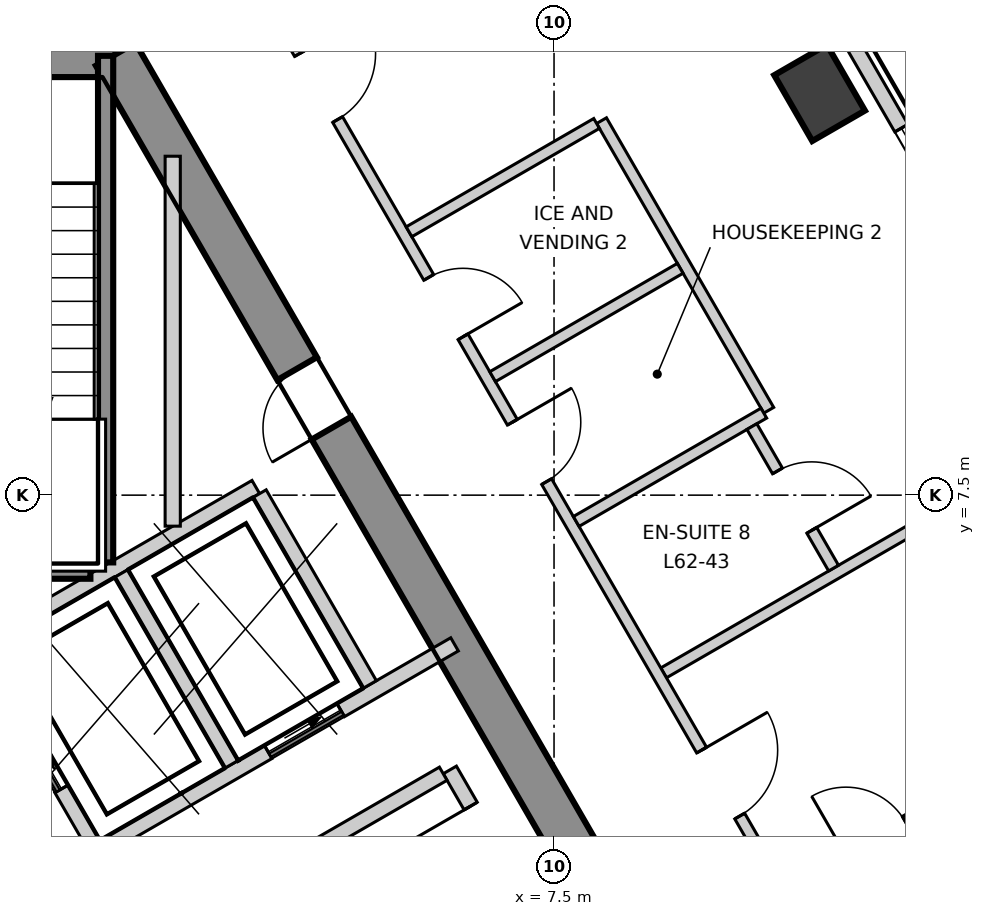
"""IFC4 building model, lengths in metres.
Left out: names, types, materials, properties, quantities, classifications, styles, units other than length and angle.
Written with IfcOpenShell. Run it as: python <this file> out.ifc"""

import sys

from ifc_helpers import new_model, si_unit, direction, frame, frame_2d, origin, origin_2d, place, context, subcontext, project, spatial, polyline, rectangle, outline, extrude, element, fill, save


model = new_model("IFC4")
c1 = context("Model", 3, precision=1e-05, world=origin(), true_north=direction((0.0, 1.0)))
c2 = subcontext(c1, "Body", "Model", "MODEL_VIEW")
j1 = project(units=[si_unit("LENGTHUNIT", "METRE"), si_unit("PLANEANGLEUNIT", "RADIAN")], contexts=[c1])
p1 = place(None, origin())
s1 = spatial("IfcSite", under=j1, at=p1, CompositionType="ELEMENT")
p2 = place(p1, origin())
s2 = spatial("IfcBuilding", under=s1, at=p2, CompositionType="ELEMENT")
p3 = place(p2, frame((0.0, 0.0, 268.3)))
s3 = spatial("IfcBuildingStorey", under=s2, at=p3, CompositionType="ELEMENT", Elevation=268.3)
p4 = place(p3, frame((1.732, 13.3, -0.3), z_axis=(0.0, 0.0, 1.0), x_axis=(-1.0, 0.0, 0.0)))
e1 = element("IfcWall", 1, at=p4, inside=s3, PredefinedType="SHEAR", context=c2, shape_type="SweptSolid", body=[
    extrude(outline(polyline([(-0.173, -0.3), (1.732, -0.3), (3.637, -0.3), (3.291, 0.3), (1.732, 0.3), (0.173, 0.3), (-0.173, -0.3)])), origin(), (0.0, 0.0, 1.0), 3.6),
])
p5 = place(p4, frame((1.032, 0.0, 0.3)))
e2 = element("IfcOpeningElement", 2, at=p5, cuts=e1, PredefinedType="OPENING", context=c2, shape_type="SweptSolid", body=[
    extrude(rectangle(XDim=1.4, YDim=2.1, at=frame_2d((0.7, 1.05))), frame((0.0, 0.31, 0.0), z_axis=(0.0, -1.0, 0.0), x_axis=(1.0, 0.0, 0.0)), (0.0, 0.0, 1.0), 0.62),
])
p6 = place(p3, frame((12.384, -5.15, -0.3), z_axis=(0.0, 0.0, 1.0), x_axis=(-0.500000539815, 0.866025092122, 0.0)))
e3 = element("IfcWall", 3, at=p6, inside=s3, PredefinedType="SHEAR", context=c2, shape_type="SweptSolid", body=[
    extrude(outline(polyline([(-0.173, -0.301), (1.795, -0.301), (3.763, -0.301), (5.731, -0.301), (7.7, -0.301), (9.668, -0.301), (11.636, -0.301), (13.604, -0.3), (15.573, -0.3), (17.541, -0.3), (19.509, -0.3), (21.477, -0.3), (21.131, 0.3), (19.226, 0.3), (17.321, 0.3), (15.415, 0.3), (13.51, 0.3), (11.605, 0.3), (9.699, 0.3), (7.794, 0.3), (5.889, 0.3), (3.984, 0.3), (2.078, 0.3), (0.173, 0.3), (-0.173, -0.301)])), origin(), (0.0, 0.0, 1.0), 3.6),
])
p7 = place(p6, frame((15.627, 0.0, 0.3)))
e4 = element("IfcOpeningElement", 4, at=p7, cuts=e3, PredefinedType="OPENING", context=c2, shape_type="SweptSolid", body=[
    extrude(rectangle(XDim=0.9, YDim=2.1, at=frame_2d((0.45, 1.05))), frame((0.0, 0.31, 0.0), z_axis=(0.0, -1.0, 0.0), x_axis=(1.0, 0.0, 0.0)), (0.0, 0.0, 1.0), 0.621),
])
p8 = place(p6, frame((4.026, 0.0, 0.3)))
e5 = element("IfcOpeningElement", 5, at=p8, cuts=e3, PredefinedType="OPENING", context=c2, shape_type="SweptSolid", body=[
    extrude(rectangle(XDim=0.9, YDim=2.1, at=frame_2d((0.45, 1.05))), frame((0.0, 0.31, 0.0), z_axis=(0.0, -1.0, 0.0), x_axis=(1.0, 0.0, 0.0)), (0.0, 0.0, 1.0), 0.621),
])
p9 = place(p3, frame((10.994, 12.792, -0.3), z_axis=(0.0, 0.0, 1.0), x_axis=(-0.5, 0.866025403784, 0.0)))
e6 = element("IfcColumn", 6, at=p9, inside=s3, PredefinedType="COLUMN", context=c2, shape_type="SweptSolid", body=[
    extrude(rectangle(XDim=1.0, YDim=0.8, at=origin_2d()), origin(), (0.0, 0.0, 1.0), 3.6),
])
p10 = place(p3, frame((26.205, -12.154, 0.0), z_axis=(0.0, 0.0, 1.0), x_axis=(-0.49999909388, 0.866025926932, 0.0)))
e7 = element("IfcWall", 7, at=p10, inside=s3, PredefinedType="ELEMENTEDWALL", context=c2, shape_type="SweptSolid", body=[
    extrude(rectangle(XDim=47.236, YDim=0.2, at=frame_2d((23.618, 0.0))), origin(), (0.0, 0.0, 1.0), 3.3),
])
p11 = place(p10, frame((2.243, 0.0, 0.9)))
e8 = element("IfcOpeningElement", 8, at=p11, cuts=e7, PredefinedType="OPENING", context=c2, shape_type="SweptSolid", body=[
    extrude(rectangle(XDim=3.7, YDim=2.2, at=frame_2d((1.85, 1.1))), frame((0.0, 0.11, 0.0), z_axis=(0.0, -1.0, 0.0), x_axis=(1.0, 0.0, 0.0)), (0.0, 0.0, 1.0), 0.22),
])
p12 = place(p10, frame((7.825, 0.0, 0.9)))
e9 = element("IfcOpeningElement", 9, at=p12, cuts=e7, PredefinedType="OPENING", context=c2, shape_type="SweptSolid", body=[
    extrude(rectangle(XDim=3.7, YDim=2.2, at=frame_2d((1.85, 1.1))), frame((0.0, 0.11, 0.0), z_axis=(0.0, -1.0, 0.0), x_axis=(1.0, 0.0, 0.0)), (0.0, 0.0, 1.0), 0.22),
])
p13 = place(p10, frame((13.406, 0.0, 0.9)))
e10 = element("IfcOpeningElement", 10, at=p13, cuts=e7, PredefinedType="OPENING", context=c2, shape_type="SweptSolid", body=[
    extrude(rectangle(XDim=3.7, YDim=2.2, at=frame_2d((1.85, 1.1))), frame((0.0, 0.11, 0.0), z_axis=(0.0, -1.0, 0.0), x_axis=(1.0, 0.0, 0.0)), (0.0, 0.0, 1.0), 0.22),
])
p14 = place(p10, frame((18.987, 0.0, 0.9)))
e11 = element("IfcOpeningElement", 11, at=p14, cuts=e7, PredefinedType="OPENING", context=c2, shape_type="SweptSolid", body=[
    extrude(rectangle(XDim=3.7, YDim=2.2, at=frame_2d((1.85, 1.1))), frame((0.0, 0.11, 0.0), z_axis=(0.0, -1.0, 0.0), x_axis=(1.0, 0.0, 0.0)), (0.0, 0.0, 1.0), 0.22),
])
p15 = place(p10, frame((24.569, 0.0, 0.9)))
e12 = element("IfcOpeningElement", 12, at=p15, cuts=e7, PredefinedType="OPENING", context=c2, shape_type="SweptSolid", body=[
    extrude(rectangle(XDim=3.7, YDim=2.2, at=frame_2d((1.85, 1.1))), frame((0.0, 0.11, 0.0), z_axis=(0.0, -1.0, 0.0), x_axis=(1.0, 0.0, 0.0)), (0.0, 0.0, 1.0), 0.22),
])
p16 = place(p10, frame((30.15, 0.0, 0.9)))
e13 = element("IfcOpeningElement", 13, at=p16, cuts=e7, PredefinedType="OPENING", context=c2, shape_type="SweptSolid", body=[
    extrude(rectangle(XDim=3.7, YDim=2.2, at=frame_2d((1.85, 1.1))), frame((0.0, 0.11, 0.0), z_axis=(0.0, -1.0, 0.0), x_axis=(1.0, 0.0, 0.0)), (0.0, 0.0, 1.0), 0.22),
])
p17 = place(p10, frame((35.732, 0.0, 0.9)))
e14 = element("IfcOpeningElement", 14, at=p17, cuts=e7, PredefinedType="OPENING", context=c2, shape_type="SweptSolid", body=[
    extrude(rectangle(XDim=3.7, YDim=2.2, at=frame_2d((1.85, 1.1))), frame((0.0, 0.11, 0.0), z_axis=(0.0, -1.0, 0.0), x_axis=(1.0, 0.0, 0.0)), (0.0, 0.0, 1.0), 0.22),
])
p18 = place(p10, frame((41.313, 0.0, 0.9)))
e15 = element("IfcOpeningElement", 15, at=p18, cuts=e7, PredefinedType="OPENING", context=c2, shape_type="SweptSolid", body=[
    extrude(rectangle(XDim=3.7, YDim=2.2, at=frame_2d((1.85, 1.1))), frame((0.0, 0.11, 0.0), z_axis=(0.0, -1.0, 0.0), x_axis=(1.0, 0.0, 0.0)), (0.0, 0.0, 1.0), 0.22),
])
p19 = place(p3, frame((8.942, 5.162, 0.0), z_axis=(0.0, 0.0, 1.0), x_axis=(0.866004272968, 0.500036597862, 0.0)))
e16 = element("IfcWall", 16, at=p19, inside=s3, PredefinedType="PARTITIONING", context=c2, shape_type="SweptSolid", body=[
    extrude(rectangle(XDim=6.211, YDim=0.15, at=frame_2d((3.106, 0.0))), origin(), (0.0, 0.0, 1.0), 2.8),
])
p20 = place(p3, frame((0.075, 20.37, 0.0), z_axis=(0.0, 0.0, 1.0), x_axis=(0.499988971979, -0.866031770721, 0.0)))
e17 = element("IfcWall", 17, at=p20, inside=s3, PredefinedType="PARTITIONING", context=c2, shape_type="SweptSolid", body=[
    extrude(rectangle(XDim=35.207, YDim=0.15, at=frame_2d((17.604, 0.0))), origin(), (0.0, 0.0, 1.0), 3.3),
])
p21 = place(p20, frame((31.606, 0.0, 0.0)))
e18 = element("IfcOpeningElement", 18, at=p21, cuts=e17, PredefinedType="OPENING", context=c2, shape_type="SweptSolid", body=[
    extrude(rectangle(XDim=1.0, YDim=2.1, at=frame_2d((0.5, 1.05))), frame((0.0, 0.085, 0.0), z_axis=(0.0, -1.0, 0.0), x_axis=(1.0, 0.0, 0.0)), (0.0, 0.0, 1.0), 0.17),
])
p22 = place(p20, frame((24.316, 0.0, 0.0)))
e19 = element("IfcOpeningElement", 19, at=p22, cuts=e17, PredefinedType="OPENING", context=c2, shape_type="SweptSolid", body=[
    extrude(rectangle(XDim=1.0, YDim=2.1, at=frame_2d((0.5, 1.05))), frame((0.0, 0.085, 0.0), z_axis=(0.0, -1.0, 0.0), x_axis=(1.0, 0.0, 0.0)), (0.0, 0.0, 1.0), 0.17),
])
p23 = place(p20, frame((18.735, 0.0, 0.0)))
e20 = element("IfcOpeningElement", 20, at=p23, cuts=e17, PredefinedType="OPENING", context=c2, shape_type="SweptSolid", body=[
    extrude(rectangle(XDim=1.0, YDim=2.1, at=frame_2d((0.5, 1.05))), frame((0.0, 0.085, 0.0), z_axis=(0.0, -1.0, 0.0), x_axis=(1.0, 0.0, 0.0)), (0.0, 0.0, 1.0), 0.17),
])
p24 = place(p20, frame((8.154, 0.0, 0.0)))
e21 = element("IfcOpeningElement", 21, at=p24, cuts=e17, PredefinedType="OPENING", context=c2, shape_type="SweptSolid", body=[
    extrude(rectangle(XDim=1.0, YDim=2.1, at=frame_2d((0.5, 1.05))), frame((0.0, 0.085, 0.0), z_axis=(0.0, -1.0, 0.0), x_axis=(1.0, 0.0, 0.0)), (0.0, 0.0, 1.0), 0.17),
])
p25 = place(p20, frame((13.754, 0.0, 0.0)))
e22 = element("IfcOpeningElement", 22, at=p25, cuts=e17, PredefinedType="OPENING", context=c2, shape_type="SweptSolid", body=[
    extrude(rectangle(XDim=0.9, YDim=2.1, at=frame_2d((0.45, 1.05))), frame((0.0, 0.085, 0.0), z_axis=(0.0, -1.0, 0.0), x_axis=(1.0, 0.0, 0.0)), (0.0, 0.0, 1.0), 0.17),
])
p26 = place(p20, frame((11.554, 0.0, 0.0)))
e23 = element("IfcOpeningElement", 23, at=p26, cuts=e17, PredefinedType="OPENING", context=c2, shape_type="SweptSolid", body=[
    extrude(rectangle(XDim=0.9, YDim=2.1, at=frame_2d((0.45, 1.05))), frame((0.0, 0.085, 0.0), z_axis=(0.0, -1.0, 0.0), x_axis=(1.0, 0.0, 0.0)), (0.0, 0.0, 1.0), 0.17),
])
p27 = place(p20, frame((2.69, 0.0, 0.0)))
e24 = element("IfcOpeningElement", 24, at=p27, cuts=e17, PredefinedType="OPENING", context=c2, shape_type="SweptSolid", body=[
    extrude(rectangle(XDim=1.0, YDim=2.1, at=frame_2d((0.5, 1.05))), frame((0.0, 0.085, 0.0), z_axis=(0.0, -1.0, 0.0), x_axis=(1.0, 0.0, 0.0)), (0.0, 0.0, 1.0), 0.17),
])
p28 = place(p3, frame((8.125, 12.427, 0.0), z_axis=(0.0, 0.0, 1.0), x_axis=(0.500036278648, -0.866004457284, 0.0)))
e25 = element("IfcWall", 25, at=p28, inside=s3, PredefinedType="PARTITIONING", context=c2, shape_type="SweptSolid", body=[
    extrude(rectangle(XDim=4.4, YDim=0.15, at=frame_2d((2.2, 0.0))), origin(), (0.0, 0.0, 1.0), 3.3),
])
for number, where, z_axis, x_axis in (
    (26, (5.592, 10.965, 0.0), (0.0, 0.0, 1.0), (0.866, 0.5, 0.0)),
    (27, (6.692, 9.059, 0.0), (0.0, 0.0, 1.0), (0.866, 0.5, 0.0)),
    (28, (7.792, 7.154, 0.0), (0.0, 0.0, 1.0), (0.866, 0.5, 0.0)),
):
    element("IfcWall", number, at=place(p3, frame(where, z_axis=z_axis, x_axis=x_axis)), inside=s3, PredefinedType="PARTITIONING", context=c2, shape_type="SweptSolid", body=[
        extrude(rectangle(XDim=2.85, YDim=0.15, at=frame_2d((1.425, 0.0))), origin(), (0.0, 0.0, 1.0), 3.3),
    ])
p29 = place(p3, frame((11.732, 0.329, 0.0), z_axis=(0.0, 0.0, 1.0), x_axis=(0.866043575568, 0.499968524226, 0.0)))
e29 = element("IfcWall", 29, at=p29, inside=s3, PredefinedType="PARTITIONING", context=c2, shape_type="SweptSolid", body=[
    extrude(rectangle(XDim=6.212, YDim=0.15, at=frame_2d((3.106, 0.0))), origin(), (0.0, 0.0, 1.0), 3.3),
])
p30 = place(p3, frame((10.103, 8.402, 0.0), z_axis=(0.0, 0.0, 1.0), x_axis=(0.499961633463, -0.866047553582, 0.0)))
e30 = element("IfcWall", 30, at=p30, inside=s3, PredefinedType="PARTITIONING", context=c2, shape_type="SweptSolid", body=[
    extrude(rectangle(XDim=2.15, YDim=0.15, at=frame_2d((1.075, 0.0))), origin(), (0.0, 0.0, 1.0), 3.3),
])
p31 = place(p30, frame((0.675, 0.0, 0.0)))
e31 = element("IfcOpeningElement", 31, at=p31, cuts=e30, PredefinedType="OPENING", context=c2, shape_type="SweptSolid", body=[
    extrude(rectangle(XDim=0.9, YDim=2.1, at=frame_2d((0.45, 1.05))), frame((0.0, 0.085, 0.0), z_axis=(0.0, -1.0, 0.0), x_axis=(1.0, 0.0, 0.0)), (0.0, 0.0, 1.0), 0.17),
])
p32 = place(p3, frame((10.582, 2.321, 0.0), z_axis=(0.0, 0.0, 1.0), x_axis=(0.866102706185, 0.499866084405, 0.0)))
e32 = element("IfcWall", 32, at=p32, inside=s3, PredefinedType="PARTITIONING", context=c2, shape_type="SweptSolid", body=[
    extrude(rectangle(XDim=2.551, YDim=0.15, at=frame_2d((1.275, 0.0))), origin(), (0.0, 0.0, 1.0), 3.3),
])
p33 = place(p32, frame((0.875, 0.0, 0.0)))
e33 = element("IfcOpeningElement", 33, at=p33, cuts=e32, PredefinedType="OPENING", context=c2, shape_type="SweptSolid", body=[
    extrude(rectangle(XDim=0.9, YDim=2.1, at=frame_2d((0.45, 1.05))), frame((0.0, 0.085, 0.0), z_axis=(0.0, -1.0, 0.0), x_axis=(1.0, 0.0, 0.0)), (0.0, 0.0, 1.0), 0.17),
])
p34 = place(p3, frame((-0.002, 5.541, 0.0), z_axis=(0.0, 0.0, 1.0), x_axis=(0.86600155993, 0.500041296494, 0.0)))
e34 = element("IfcWall", 34, at=p34, inside=s3, PredefinedType="SOLIDWALL", context=c2, shape_type="SweptSolid", body=[
    extrude(rectangle(XDim=4.132, YDim=0.2, at=frame_2d((2.066, 0.0))), origin(), (0.0, 0.0, 1.0), 3.3),
])
p35 = place(p3, frame((0.0, 5.4, 0.0), z_axis=(0.0, 0.0, 1.0), x_axis=(0.500103862429, -0.865965430478, 0.0)))
e35 = element("IfcWall", 35, at=p35, inside=s3, PredefinedType="SOLIDWALL", context=c2, shape_type="SweptSolid", body=[
    extrude(rectangle(XDim=2.973, YDim=0.2, at=frame_2d((1.487, 0.0))), origin(), (0.0, 0.0, 1.0), 3.3),
])
p36 = place(p35, frame((0.937, 0.0, 0.0)))
e36 = element("IfcOpeningElement", 36, at=p36, cuts=e35, PredefinedType="OPENING", context=c2, shape_type="SweptSolid", body=[
    extrude(rectangle(XDim=1.1, YDim=2.1, at=frame_2d((0.55, 1.05))), frame((0.0, 0.11, 0.0), z_axis=(0.0, -1.0, 0.0), x_axis=(1.0, 0.0, 0.0)), (0.0, 0.0, 1.0), 0.22),
])
p37 = place(p3, frame((1.578, 2.874, 0.0), z_axis=(0.0, 0.0, 1.0), x_axis=(0.866045911672, 0.499964477614, 0.0)))
e37 = element("IfcWall", 37, at=p37, inside=s3, PredefinedType="SOLIDWALL", context=c2, shape_type="SweptSolid", body=[
    extrude(rectangle(XDim=5.327, YDim=0.2, at=frame_2d((2.663, 0.0))), origin(), (0.0, 0.0, 1.0), 3.3),
])
p38 = place(p37, frame((2.496, 0.0, 0.0)))
e38 = element("IfcOpeningElement", 38, at=p38, cuts=e37, PredefinedType="OPENING", context=c2, shape_type="SweptSolid", body=[
    extrude(rectangle(XDim=1.1, YDim=2.1, at=frame_2d((0.55, 1.05))), frame((0.0, 0.11, 0.0), z_axis=(0.0, -1.0, 0.0), x_axis=(1.0, 0.0, 0.0)), (0.0, 0.0, 1.0), 0.22),
])
for number, where, z_axis, x_axis in (
    (39, (1.807, 6.47, 0.0), (0.0, 0.0, 1.0), (0.5, -0.866, 0.0)),
    (40, (3.626, 7.52, 0.0), (0.0, 0.0, 1.0), (0.5, -0.866, 0.0)),
):
    element("IfcWall", number, at=place(p3, frame(where, z_axis=z_axis, x_axis=x_axis)), inside=s3, PredefinedType="SOLIDWALL", context=c2, shape_type="SweptSolid", body=[
        extrude(rectangle(XDim=2.9, YDim=0.2, at=frame_2d((1.45, 0.0))), origin(), (0.0, 0.0, 1.0), 3.3),
    ])
p39 = place(p3, frame((6.129, 3.885, 0.0), z_axis=(0.0, 0.0, 1.0), x_axis=(0.499952260202, -0.866052964615, 0.0)))
e41 = element("IfcWall", 41, at=p39, inside=s3, PredefinedType="SOLIDWALL", context=c2, shape_type="SweptSolid", body=[
    extrude(rectangle(XDim=1.901, YDim=0.2, at=frame_2d((0.95, 0.0))), origin(), (0.0, 0.0, 1.0), 3.3),
])
p40 = place(p39, frame((0.55, 0.0, 0.0)))
e42 = element("IfcOpeningElement", 42, at=p40, cuts=e41, PredefinedType="OPENING", context=c2, shape_type="SweptSolid", body=[
    extrude(rectangle(XDim=0.9, YDim=2.1, at=frame_2d((0.45, 1.05))), frame((0.0, 0.11, 0.0), z_axis=(0.0, -1.0, 0.0), x_axis=(1.0, 0.0, 0.0)), (0.0, 0.0, 1.0), 0.22),
])
p41 = place(p3, frame((2.275, 1.66, 0.0), z_axis=(0.0, 0.0, 1.0), x_axis=(0.866013608182, 0.500020430026, 0.0)))
e43 = element("IfcWall", 43, at=p41, inside=s3, PredefinedType="SOLIDWALL", context=c2, shape_type="SweptSolid", body=[
    extrude(rectangle(XDim=4.35, YDim=0.2, at=frame_2d((2.175, 0.0))), origin(), (0.0, 0.0, 1.0), 3.3),
])
p42 = place(p3, frame((2.483, 7.092, 0.0), z_axis=(0.0, 0.0, 1.0), x_axis=(0.0, 1.0, 0.0)))
e44 = element("IfcWall", 44, at=p42, inside=s3, PredefinedType="SOLIDWALL", context=c2, shape_type="SweptSolid", body=[
    extrude(rectangle(XDim=4.867, YDim=0.2, at=frame_2d((2.434, 0.0))), origin(), (0.0, 0.0, 1.0), 3.3),
])
p43 = place(p3, frame((1.6, 6.615, 0.0), z_axis=(0.0, 0.0, 1.0), x_axis=(0.0, 1.0, 0.0)))
e45 = element("IfcWall", 45, at=p43, inside=s3, PredefinedType="SOLIDWALL", context=c2, shape_type="SweptSolid", body=[
    extrude(rectangle(XDim=6.665, YDim=0.2, at=frame_2d((3.333, 0.0))), origin(), (0.0, 0.0, 1.0), 3.3),
])
p44 = place(p3, frame((-1.4, 6.5, 0.0), z_axis=(0.0, 0.0, 1.0), x_axis=(1.0, 0.0, 0.0)))
e46 = element("IfcWall", 46, at=p44, inside=s3, PredefinedType="SOLIDWALL", context=c2, shape_type="SweptSolid", body=[
    extrude(rectangle(XDim=2.8, YDim=0.2, at=frame_2d((1.4, 0.0))), origin(), (0.0, 0.0, 1.0), 3.3),
])
p45 = place(p15, origin())
e47 = element("IfcWindow", 47, at=p45, inside=s3, PartitioningType="SINGLE_PANEL", PredefinedType="WINDOW", context=c2, shape_type="SweptSolid", body=[
    extrude(rectangle(XDim=3.7, YDim=2.2, at=frame_2d((1.85, 1.1))), frame((0.0, 0.03, 0.0), z_axis=(0.0, -1.0, 0.0), x_axis=(1.0, 0.0, 0.0)), (0.0, 0.0, 1.0), 0.06),
])
fill(e12, e47)
p46 = place(p36, origin())
e48 = element("IfcDoor", 48, at=p46, inside=s3, OperationType="SLIDING_TO_LEFT", PredefinedType="DOOR", context=c2, shape_type="SweptSolid", body=[
    extrude(rectangle(XDim=1.1, YDim=2.1, at=frame_2d((0.55, 1.05))), frame((0.0, 0.025, 0.0), z_axis=(0.0, -1.0, 0.0), x_axis=(1.0, 0.0, 0.0)), (0.0, 0.0, 1.0), 0.05),
])
fill(e36, e48)
p47 = place(p38, origin())
e49 = element("IfcDoor", 49, at=p47, inside=s3, OperationType="SLIDING_TO_LEFT", PredefinedType="DOOR", context=c2, shape_type="SweptSolid", body=[
    extrude(rectangle(XDim=1.1, YDim=2.1, at=frame_2d((0.55, 1.05))), frame((0.0, 0.025, 0.0), z_axis=(0.0, -1.0, 0.0), x_axis=(1.0, 0.0, 0.0)), (0.0, 0.0, 1.0), 0.05),
])
fill(e38, e49)
p48 = place(p23, origin())
e50 = element("IfcDoor", 50, at=p48, inside=s3, OperationType="SINGLE_SWING_RIGHT", PredefinedType="DOOR", context=c2, shape_type="SweptSolid", body=[
    extrude(rectangle(XDim=1.0, YDim=2.1, at=frame_2d((0.5, 1.05))), frame((0.0, 0.025, 0.0), z_axis=(0.0, -1.0, 0.0), x_axis=(1.0, 0.0, 0.0)), (0.0, 0.0, 1.0), 0.05),
])
fill(e20, e50)
p49 = place(p33, origin())
e51 = element("IfcDoor", 51, at=p49, inside=s3, OperationType="SINGLE_SWING_RIGHT", PredefinedType="DOOR", context=c2, shape_type="SweptSolid", body=[
    extrude(rectangle(XDim=0.9, YDim=2.1, at=frame_2d((0.45, 1.05))), frame((0.0, 0.025, 0.0), z_axis=(0.0, -1.0, 0.0), x_axis=(1.0, 0.0, 0.0)), (0.0, 0.0, 1.0), 0.05),
])
fill(e33, e51)
p50 = place(p24, origin())
e52 = element("IfcDoor", 52, at=p50, inside=s3, OperationType="SINGLE_SWING_RIGHT", PredefinedType="DOOR", context=c2, shape_type="SweptSolid", body=[
    extrude(rectangle(XDim=1.0, YDim=2.1, at=frame_2d((0.5, 1.05))), frame((0.0, 0.025, 0.0), z_axis=(0.0, -1.0, 0.0), x_axis=(1.0, 0.0, 0.0)), (0.0, 0.0, 1.0), 0.05),
])
fill(e21, e52)
p51 = place(p31, origin())
e53 = element("IfcDoor", 53, at=p51, inside=s3, OperationType="SINGLE_SWING_LEFT", PredefinedType="DOOR", context=c2, shape_type="SweptSolid", body=[
    extrude(rectangle(XDim=0.9, YDim=2.1, at=frame_2d((0.45, 1.05))), frame((0.0, 0.025, 0.0), z_axis=(0.0, -1.0, 0.0), x_axis=(1.0, 0.0, 0.0)), (0.0, 0.0, 1.0), 0.05),
])
fill(e31, e53)
p52 = place(p25, origin())
e54 = element("IfcDoor", 54, at=p52, inside=s3, OperationType="SINGLE_SWING_RIGHT", PredefinedType="DOOR", context=c2, shape_type="SweptSolid", body=[
    extrude(rectangle(XDim=0.9, YDim=2.1, at=frame_2d((0.45, 1.05))), frame((0.0, 0.025, 0.0), z_axis=(0.0, -1.0, 0.0), x_axis=(1.0, 0.0, 0.0)), (0.0, 0.0, 1.0), 0.05),
])
fill(e22, e54)
p53 = place(p26, origin())
e55 = element("IfcDoor", 55, at=p53, inside=s3, OperationType="SINGLE_SWING_LEFT", PredefinedType="DOOR", context=c2, shape_type="SweptSolid", body=[
    extrude(rectangle(XDim=0.9, YDim=2.1, at=frame_2d((0.45, 1.05))), frame((0.0, 0.025, 0.0), z_axis=(0.0, -1.0, 0.0), x_axis=(1.0, 0.0, 0.0)), (0.0, 0.0, 1.0), 0.05),
])
fill(e23, e55)
p54 = place(p7, origin())
e56 = element("IfcDoor", 56, at=p54, inside=s3, OperationType="SINGLE_SWING_RIGHT", PredefinedType="DOOR", context=c2, shape_type="SweptSolid", body=[
    extrude(rectangle(XDim=0.9, YDim=2.1, at=frame_2d((0.45, 1.05))), frame((0.0, 0.025, 0.0), z_axis=(0.0, -1.0, 0.0), x_axis=(1.0, 0.0, 0.0)), (0.0, 0.0, 1.0), 0.05),
])
fill(e4, e56)
p55 = place(p40, origin())
e57 = element("IfcDoor", 57, at=p55, inside=s3, OperationType="SINGLE_SWING_LEFT", PredefinedType="DOOR", context=c2, shape_type="SweptSolid", body=[
    extrude(rectangle(XDim=0.9, YDim=2.1, at=frame_2d((0.45, 1.05))), frame((0.0, 0.025, 0.0), z_axis=(0.0, -1.0, 0.0), x_axis=(1.0, 0.0, 0.0)), (0.0, 0.0, 1.0), 0.05),
])
fill(e42, e57)
save(model, sys.argv[1])
